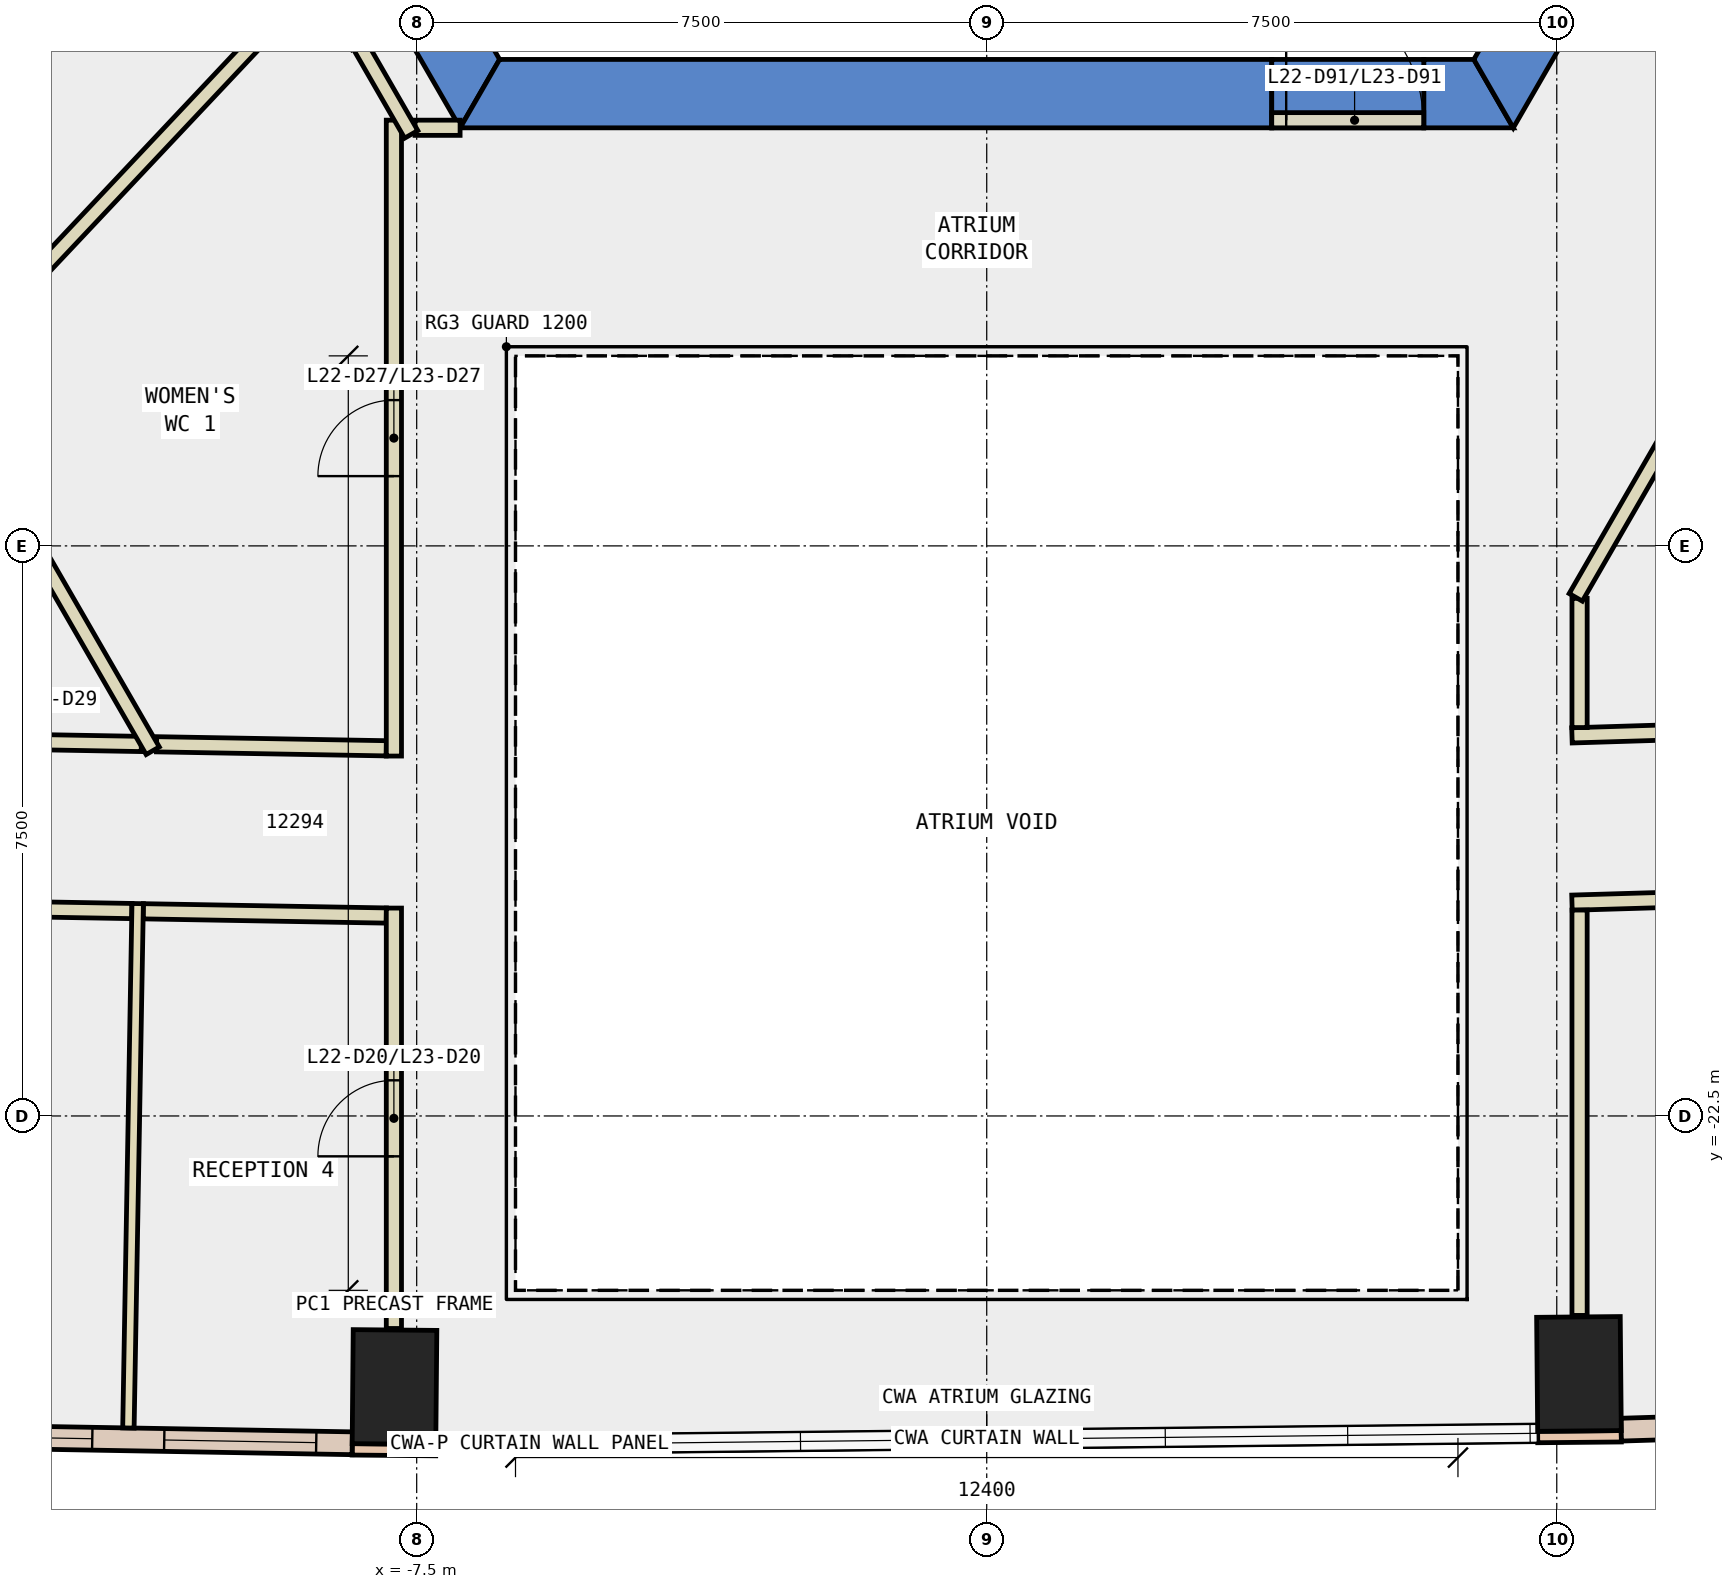
"""IFC4 building model, lengths in metres.
Left out: names, types, materials, properties, quantities, classifications, styles, units other than length and angle.
Written with IfcOpenShell. Run it as: python <this file> out.ifc"""

import sys

from ifc_helpers import new_model, si_unit, direction, frame, frame_2d, origin, origin_2d, place, context, subcontext, project, spatial, polyline, rectangle, outline, extrude, element, fill, save


model = new_model("IFC4")
c1 = context("Model", 3, precision=1e-05, world=origin(), true_north=direction((0.0, 1.0)))
c2 = subcontext(c1, "Body", "Model", "MODEL_VIEW")
j1 = project(units=[si_unit("LENGTHUNIT", "METRE"), si_unit("PLANEANGLEUNIT", "RADIAN")], contexts=[c1])
p1 = place(None, origin())
s1 = spatial("IfcSite", under=j1, at=p1, CompositionType="ELEMENT")
p2 = place(p1, origin())
s2 = spatial("IfcBuilding", under=s1, at=p2, CompositionType="ELEMENT")
p3 = place(p2, frame((0.0, 0.0, 103.4)))
s3 = spatial("IfcBuildingStorey", under=s2, at=p3, CompositionType="ELEMENT", Elevation=103.4)
for number, where, z_axis, x_axis in (
    (1, (-7.792, -26.066, -0.4), (0.0, 0.0, 1.0), (-1.0, 0.009, 0.0)),
    (2, (7.792, -25.894, -0.4), (0.0, 0.0, 1.0), (1.0, 0.009, 0.0)),
):
    element("IfcColumn", number, at=place(p3, frame(where, z_axis=z_axis, x_axis=x_axis)), inside=s3, PredefinedType="COLUMN", context=c2, shape_type="SweptSolid", body=[
        extrude(rectangle(XDim=1.1, YDim=1.5, at=origin_2d()), origin(), (0.0, 0.0, 1.0), 4.2),
    ])
p4 = place(p3, frame((0.0, 0.0, -0.4)))
e3 = element("IfcWall", 3, at=p4, inside=s3, PredefinedType="SHEAR", context=c2, shape_type="SweptSolid", body=[
    extrude(outline(polyline([(-13.856, 2.5), (-6.928, -9.5), (-6.409, -8.6), (-12.817, 2.5), (-13.856, 2.5)])), origin(), (0.0, 0.0, 1.0), 4.2),
])
p5 = place(p3, frame((0.0, 0.0, -0.4)))
e4 = element("IfcWall", 4, at=p5, inside=s3, PredefinedType="SHEAR", context=c2, shape_type="SweptSolid", body=[
    extrude(outline(polyline([(3.75, -9.5), (3.75, -8.6), (-6.409, -8.6), (-6.928, -9.5), (3.75, -9.5)])), origin(), (0.0, 0.0, 1.0), 4.2),
])
p6 = place(p3, frame((0.0, 0.0, -0.4)))
e5 = element("IfcWall", 5, at=p6, inside=s3, PredefinedType="SHEAR", context=c2, shape_type="SweptSolid", body=[
    extrude(outline(polyline([(5.75, -8.6), (5.75, -9.5), (6.928, -9.5), (6.409, -8.6), (5.75, -8.6)])), origin(), (0.0, 0.0, 1.0), 4.2),
])
p7 = place(p3, frame((0.0, 0.0, 3.6)))
e6 = element("IfcWall", 6, at=p7, inside=s3, PredefinedType="SHEAR", context=c2, shape_type="SweptSolid", body=[
    extrude(outline(polyline([(5.75, -9.5), (5.75, -8.6), (3.75, -8.6), (3.75, -9.5), (5.75, -9.5)])), origin(), (0.0, 0.0, 1.0), 0.2),
])
p8 = place(p3, frame((0.0, 0.0, -0.4)))
e7 = element("IfcWall", 7, at=p8, inside=s3, PredefinedType="SHEAR", context=c2, shape_type="SweptSolid", body=[
    extrude(outline(polyline([(8.117, -7.44), (7.338, -6.99), (6.409, -8.6), (6.928, -9.5), (8.117, -7.44)])), origin(), (0.0, 0.0, 1.0), 4.2),
])
p9 = place(p3, frame((-9.31, -5.375, -0.4), z_axis=(0.0, 0.0, 1.0), x_axis=(-0.866017533419, -0.500013631625, 0.0)))
e8 = element("IfcWall", 8, at=p9, inside=s3, PredefinedType="SHEAR", context=c2, shape_type="SweptSolid", body=[
    extrude(rectangle(XDim=9.0, YDim=0.8, at=frame_2d((4.5, 0.0))), origin(), (0.0, 0.0, 1.0), 4.2),
])
for number, where, z_axis, x_axis in (
    (9, (-8.349, -26.886, 0.0), (0.0, 0.0, 1.0), (1.0, -0.009, 0.0)),
    (10, (7.249, -26.724, 0.0), (0.0, 0.0, 1.0), (1.0, 0.009, 0.0)),
):
    element("IfcWall", number, at=place(p3, frame(where, z_axis=z_axis, x_axis=x_axis)), inside=s3, PredefinedType="STANDARD", context=c2, shape_type="SweptSolid", body=[
        extrude(rectangle(XDim=1.1, YDim=0.15, at=frame_2d((0.55, 0.0))), origin(), (0.0, 0.0, 1.0), 3.8),
    ])
p10 = place(p3, frame((-14.242, -26.703, 0.0), z_axis=(0.0, 0.0, 1.0), x_axis=(0.999847261365, -0.017477240672, 0.0)))
e11 = element("IfcWall", 11, at=p10, inside=s3, PredefinedType="STANDARD", context=c2, shape_type="SweptSolid", body=[
    extrude(rectangle(XDim=5.895, YDim=0.3, at=frame_2d((2.948, 0.0))), origin(), (0.0, 0.0, 1.0), 3.8),
])
p11 = place(p10, frame((0.474, 0.0, 0.9)))
e12 = element("IfcOpeningElement", 12, at=p11, cuts=e11, PredefinedType="OPENING", context=c2, shape_type="SweptSolid", body=[
    extrude(rectangle(XDim=2.0, YDim=2.6, at=frame_2d((1.0, 1.3))), frame((0.0, 0.16, 0.0), z_axis=(0.0, -1.0, 0.0), x_axis=(1.0, 0.0, 0.0)), (0.0, 0.0, 1.0), 0.32),
])
p12 = place(p10, frame((3.421, 0.0, 0.9)))
e13 = element("IfcOpeningElement", 13, at=p12, cuts=e11, PredefinedType="OPENING", context=c2, shape_type="SweptSolid", body=[
    extrude(rectangle(XDim=2.0, YDim=2.6, at=frame_2d((1.0, 1.3))), frame((0.0, 0.16, 0.0), z_axis=(0.0, -1.0, 0.0), x_axis=(1.0, 0.0, 0.0)), (0.0, 0.0, 1.0), 0.32),
])
p13 = place(p3, frame((8.347, -26.627, 0.0), z_axis=(0.0, 0.0, 1.0), x_axis=(0.999529601824, 0.030668796478, 0.0)))
e14 = element("IfcWall", 14, at=p13, inside=s3, PredefinedType="STANDARD", context=c2, shape_type="SweptSolid", body=[
    extrude(rectangle(XDim=5.899, YDim=0.3, at=frame_2d((2.949, 0.0))), origin(), (0.0, 0.0, 1.0), 3.8),
])
p14 = place(p13, frame((0.475, 0.0, 0.9)))
e15 = element("IfcOpeningElement", 15, at=p14, cuts=e14, PredefinedType="OPENING", context=c2, shape_type="SweptSolid", body=[
    extrude(rectangle(XDim=2.0, YDim=2.6, at=frame_2d((1.0, 1.3))), frame((0.0, 0.16, 0.0), z_axis=(0.0, -1.0, 0.0), x_axis=(1.0, 0.0, 0.0)), (0.0, 0.0, 1.0), 0.32),
])
p15 = place(p13, frame((3.424, 0.0, 0.9)))
e16 = element("IfcOpeningElement", 16, at=p15, cuts=e14, PredefinedType="OPENING", context=c2, shape_type="SweptSolid", body=[
    extrude(rectangle(XDim=2.0, YDim=2.6, at=frame_2d((1.0, 1.3))), frame((0.0, 0.16, 0.0), z_axis=(0.0, -1.0, 0.0), x_axis=(1.0, 0.0, 0.0)), (0.0, 0.0, 1.0), 0.32),
])
p16 = place(p3, frame((7.7, -17.493, 0.0), z_axis=(0.0, 0.0, 1.0), x_axis=(0.999526319751, 0.030775576778, 0.0)))
e17 = element("IfcWall", 17, at=p16, inside=s3, PredefinedType="PARTITIONING", context=c2, shape_type="SweptSolid", body=[
    extrude(rectangle(XDim=6.822, YDim=0.2, at=frame_2d((3.411, 0.0))), origin(), (0.0, 0.0, 1.0), 3.8),
])
p17 = place(p16, frame((2.911, 0.0, 0.0)))
e18 = element("IfcOpeningElement", 18, at=p17, cuts=e17, PredefinedType="OPENING", context=c2, shape_type="SweptSolid", body=[
    extrude(rectangle(XDim=1.0, YDim=2.1, at=frame_2d((0.5, 1.05))), frame((0.0, 0.11, 0.0), z_axis=(0.0, -1.0, 0.0), x_axis=(1.0, 0.0, 0.0)), (0.0, 0.0, 1.0), 0.22),
])
p18 = place(p3, frame((-10.923, -17.61, 0.0), z_axis=(0.0, 0.0, 1.0), x_axis=(0.999846489632, -0.017521334753, 0.0)))
e19 = element("IfcWall", 19, at=p18, inside=s3, PredefinedType="PARTITIONING", context=c2, shape_type="SweptSolid", body=[
    extrude(rectangle(XDim=3.024, YDim=0.2, at=frame_2d((1.512, 0.0))), origin(), (0.0, 0.0, 1.0), 3.8),
])
p19 = place(p3, frame((-14.58, -17.545, 0.0), z_axis=(0.0, 0.0, 1.0), x_axis=(0.999844180431, -0.01765261618, 0.0)))
e20 = element("IfcWall", 20, at=p19, inside=s3, PredefinedType="PARTITIONING", context=c2, shape_type="SweptSolid", body=[
    extrude(rectangle(XDim=3.458, YDim=0.2, at=frame_2d((1.729, 0.0))), origin(), (0.0, 0.0, 1.0), 3.8),
])
p20 = place(p19, frame((1.229, 0.0, 0.0)))
e21 = element("IfcOpeningElement", 21, at=p20, cuts=e20, PredefinedType="OPENING", context=c2, shape_type="SweptSolid", body=[
    extrude(rectangle(XDim=1.0, YDim=2.1, at=frame_2d((0.5, 1.05))), frame((0.0, 0.11, 0.0), z_axis=(0.0, -1.0, 0.0), x_axis=(1.0, 0.0, 0.0)), (0.0, 0.0, 1.0), 0.22),
])
p21 = place(p3, frame((21.621, -19.28, 0.0), z_axis=(0.0, 0.0, 1.0), x_axis=(-0.999557957525, -0.029730280001, 0.0)))
e22 = element("IfcWall", 22, at=p21, inside=s3, PredefinedType="PARTITIONING", context=c2, shape_type="SweptSolid", body=[
    extrude(rectangle(XDim=13.927, YDim=0.2, at=frame_2d((6.964, 0.0))), origin(), (0.0, 0.0, 1.0), 3.8),
])
p22 = place(p21, frame((6.464, 0.0, 0.0)))
e23 = element("IfcOpeningElement", 23, at=p22, cuts=e22, PredefinedType="OPENING", context=c2, shape_type="SweptSolid", body=[
    extrude(rectangle(XDim=1.0, YDim=2.1, at=frame_2d((0.5, 1.05))), frame((0.0, 0.11, 0.0), z_axis=(0.0, -1.0, 0.0), x_axis=(1.0, 0.0, 0.0)), (0.0, 0.0, 1.0), 0.22),
])
p23 = place(p3, frame((-11.248, -19.804, 0.0), z_axis=(0.0, 0.0, 1.0), x_axis=(-0.999848794654, 0.017389302123, 0.0)))
e24 = element("IfcWall", 24, at=p23, inside=s3, PredefinedType="PARTITIONING", context=c2, shape_type="SweptSolid", body=[
    extrude(rectangle(XDim=3.384, YDim=0.2, at=frame_2d((1.692, 0.0))), origin(), (0.0, 0.0, 1.0), 3.8),
])
p24 = place(p3, frame((-7.9, -19.863, 0.0), z_axis=(0.0, 0.0, 1.0), x_axis=(-0.999845883554, 0.017555886191, 0.0)))
e25 = element("IfcWall", 25, at=p24, inside=s3, PredefinedType="PARTITIONING", context=c2, shape_type="SweptSolid", body=[
    extrude(rectangle(XDim=3.198, YDim=0.2, at=frame_2d((1.599, 0.0))), origin(), (0.0, 0.0, 1.0), 3.8),
])
p25 = place(p3, frame((7.8, -15.69, 0.0), z_axis=(0.0, 0.0, 1.0), x_axis=(0.0, -1.0, 0.0)))
e26 = element("IfcWall", 26, at=p25, inside=s3, PredefinedType="PARTITIONING", context=c2, shape_type="SweptSolid", body=[
    extrude(rectangle(XDim=1.7, YDim=0.2, at=frame_2d((0.85, 0.0))), origin(), (0.0, 0.0, 1.0), 3.8),
])
p26 = place(p3, frame((-7.522, -9.499, 0.0), z_axis=(0.0, 0.0, 1.0), x_axis=(1.0, 0.0, 0.0)))
e27 = element("IfcWall", 27, at=p26, inside=s3, PredefinedType="PARTITIONING", context=c2, shape_type="SweptSolid", body=[
    extrude(rectangle(XDim=0.593, YDim=0.2, at=frame_2d((0.296, 0.0))), origin(), (0.0, 0.0, 1.0), 3.8),
])
p27 = place(p3, frame((-7.8, -17.765, 0.0), z_axis=(0.0, 0.0, 1.0), x_axis=(0.0, 1.0, 0.0)))
e28 = element("IfcWall", 28, at=p27, inside=s3, PredefinedType="PARTITIONING", context=c2, shape_type="SweptSolid", body=[
    extrude(rectangle(XDim=8.366, YDim=0.2, at=frame_2d((4.183, 0.0))), origin(), (0.0, 0.0, 1.0), 3.8),
])
p28 = place(p27, frame((3.683, 0.0, 0.0)))
e29 = element("IfcOpeningElement", 29, at=p28, cuts=e28, PredefinedType="OPENING", context=c2, shape_type="SweptSolid", body=[
    extrude(rectangle(XDim=1.0, YDim=2.1, at=frame_2d((0.5, 1.05))), frame((0.0, 0.11, 0.0), z_axis=(0.0, -1.0, 0.0), x_axis=(1.0, 0.0, 0.0)), (0.0, 0.0, 1.0), 0.22),
])
p29 = place(p3, frame((7.8, -19.791, 0.0), z_axis=(0.0, 0.0, 1.0), x_axis=(0.0, -1.0, 0.0)))
e30 = element("IfcWall", 30, at=p29, inside=s3, PredefinedType="PARTITIONING", context=c2, shape_type="SweptSolid", body=[
    extrude(rectangle(XDim=5.333, YDim=0.2, at=frame_2d((2.667, 0.0))), origin(), (0.0, 0.0, 1.0), 3.8),
])
p30 = place(p3, frame((-7.8, -25.296, 0.0), z_axis=(0.0, 0.0, 1.0), x_axis=(0.0, 1.0, 0.0)))
e31 = element("IfcWall", 31, at=p30, inside=s3, PredefinedType="PARTITIONING", context=c2, shape_type="SweptSolid", body=[
    extrude(rectangle(XDim=5.531, YDim=0.2, at=frame_2d((2.766, 0.0))), origin(), (0.0, 0.0, 1.0), 3.8),
])
p31 = place(p30, frame((2.265, 0.0, 0.0)))
e32 = element("IfcOpeningElement", 32, at=p31, cuts=e31, PredefinedType="OPENING", context=c2, shape_type="SweptSolid", body=[
    extrude(rectangle(XDim=1.0, YDim=2.1, at=frame_2d((0.5, 1.05))), frame((0.0, 0.11, 0.0), z_axis=(0.0, -1.0, 0.0), x_axis=(1.0, 0.0, 0.0)), (0.0, 0.0, 1.0), 0.22),
])
p32 = place(p3, frame((12.401, -7.621, 0.0), z_axis=(0.0, 0.0, 1.0), x_axis=(-0.499983724212, -0.866034800411, 0.0)))
e33 = element("IfcWall", 33, at=p32, inside=s3, PredefinedType="PARTITIONING", context=c2, shape_type="SweptSolid", body=[
    extrude(rectangle(XDim=9.302, YDim=0.2, at=frame_2d((4.651, 0.0))), origin(), (0.0, 0.0, 1.0), 3.8),
])
p33 = place(p3, frame((-7.572, -9.586, 0.0), z_axis=(0.0, 0.0, 1.0), x_axis=(-0.499484152563, 0.866323023669, 0.0)))
e34 = element("IfcWall", 34, at=p33, inside=s3, PredefinedType="PARTITIONING", context=c2, shape_type="SweptSolid", body=[
    extrude(rectangle(XDim=1.39, YDim=0.2, at=frame_2d((0.695, 0.0))), origin(), (0.0, 0.0, 1.0), 3.8),
])
p34 = place(p3, frame((-13.865, -12.876, 0.0), z_axis=(0.0, 0.0, 1.0), x_axis=(0.685651384846, 0.727930064263, 0.0)))
e35 = element("IfcWall", 35, at=p34, inside=s3, PredefinedType="PARTITIONING", context=c2, shape_type="SweptSolid", body=[
    extrude(rectangle(XDim=7.091, YDim=0.2, at=frame_2d((3.545, 0.0))), origin(), (0.0, 0.0, 1.0), 3.8),
])
p35 = place(p3, frame((-10.973, -17.695, 0.0), z_axis=(0.0, 0.0, 1.0), x_axis=(-0.499986535608, 0.866033177315, 0.0)))
e36 = element("IfcWall", 36, at=p35, inside=s3, PredefinedType="PARTITIONING", context=c2, shape_type="SweptSolid", body=[
    extrude(rectangle(XDim=5.549, YDim=0.2, at=frame_2d((2.774, 0.0))), origin(), (0.0, 0.0, 1.0), 3.8),
])
p36 = place(p3, frame((-11.171, -19.706, 0.0), z_axis=(0.0, 0.0, 1.0), x_axis=(-0.017691335128, -0.999843496084, 0.0)))
e37 = element("IfcWall", 37, at=p36, inside=s3, PredefinedType="PARTITIONING", context=c2, shape_type="SweptSolid", body=[
    extrude(rectangle(XDim=6.9, YDim=0.15, at=frame_2d((3.45, 0.0))), origin(), (0.0, 0.0, 1.0), 3.8),
])
p37 = place(p3, frame((3.75, -9.4, 0.0), z_axis=(0.0, 0.0, 1.0), x_axis=(1.0, 0.0, 0.0)))
e38 = element("IfcWall", 38, at=p37, inside=s3, PredefinedType="PARTITIONING", context=c2, shape_type="SweptSolid", body=[
    extrude(rectangle(XDim=2.0, YDim=0.2, at=frame_2d((1.0, 0.0))), origin(), (0.0, 0.0, 1.0), 2.4),
])
p38 = place(p37, frame((0.19, 0.0, 0.0)))
e39 = element("IfcOpeningElement", 39, at=p38, cuts=e38, PredefinedType="OPENING", context=c2, shape_type="SweptSolid", body=[
    extrude(rectangle(XDim=1.8, YDim=2.1, at=frame_2d((0.9, 1.05))), frame((0.0, 0.11, 0.0), z_axis=(0.0, -1.0, 0.0), x_axis=(1.0, 0.0, 0.0)), (0.0, 0.0, 1.0), 0.22),
])
p39 = place(p11, origin())
e40 = element("IfcWindow", 40, at=p39, inside=s3, PartitioningType="SINGLE_PANEL", PredefinedType="WINDOW", context=c2, shape_type="SweptSolid", body=[
    extrude(rectangle(XDim=2.0, YDim=2.6, at=frame_2d((1.0, 1.3))), frame((0.0, 0.03, 0.0), z_axis=(0.0, -1.0, 0.0), x_axis=(1.0, 0.0, 0.0)), (0.0, 0.0, 1.0), 0.06),
])
fill(e12, e40)
p40 = place(p12, origin())
e41 = element("IfcWindow", 41, at=p40, inside=s3, PartitioningType="SINGLE_PANEL", PredefinedType="WINDOW", context=c2, shape_type="SweptSolid", body=[
    extrude(rectangle(XDim=2.0, YDim=2.6, at=frame_2d((1.0, 1.3))), frame((0.0, 0.03, 0.0), z_axis=(0.0, -1.0, 0.0), x_axis=(1.0, 0.0, 0.0)), (0.0, 0.0, 1.0), 0.06),
])
fill(e13, e41)
p41 = place(p31, origin())
e42 = element("IfcDoor", 42, at=p41, inside=s3, OperationType="SINGLE_SWING_LEFT", PredefinedType="DOOR", context=c2, shape_type="SweptSolid", body=[
    extrude(rectangle(XDim=1.0, YDim=2.1, at=frame_2d((0.5, 1.05))), frame((0.0, 0.025, 0.0), z_axis=(0.0, -1.0, 0.0), x_axis=(1.0, 0.0, 0.0)), (0.0, 0.0, 1.0), 0.05),
])
fill(e32, e42)
p42 = place(p28, origin())
e43 = element("IfcDoor", 43, at=p42, inside=s3, OperationType="SINGLE_SWING_RIGHT", PredefinedType="DOOR", context=c2, shape_type="SweptSolid", body=[
    extrude(rectangle(XDim=1.0, YDim=2.1, at=frame_2d((0.5, 1.05))), frame((0.0, 0.025, 0.0), z_axis=(0.0, -1.0, 0.0), x_axis=(1.0, 0.0, 0.0)), (0.0, 0.0, 1.0), 0.05),
])
fill(e29, e43)
p43 = place(p38, origin())
e44 = element("IfcDoor", 44, at=p43, inside=s3, OperationType="DOUBLE_DOOR_SINGLE_SWING", PredefinedType="DOOR", context=c2, shape_type="SweptSolid", body=[
    extrude(rectangle(XDim=1.8, YDim=2.1, at=frame_2d((0.9, 1.05))), frame((0.0, 0.025, 0.0), z_axis=(0.0, -1.0, 0.0), x_axis=(1.0, 0.0, 0.0)), (0.0, 0.0, 1.0), 0.05),
])
fill(e39, e44)
save(model, sys.argv[1])
